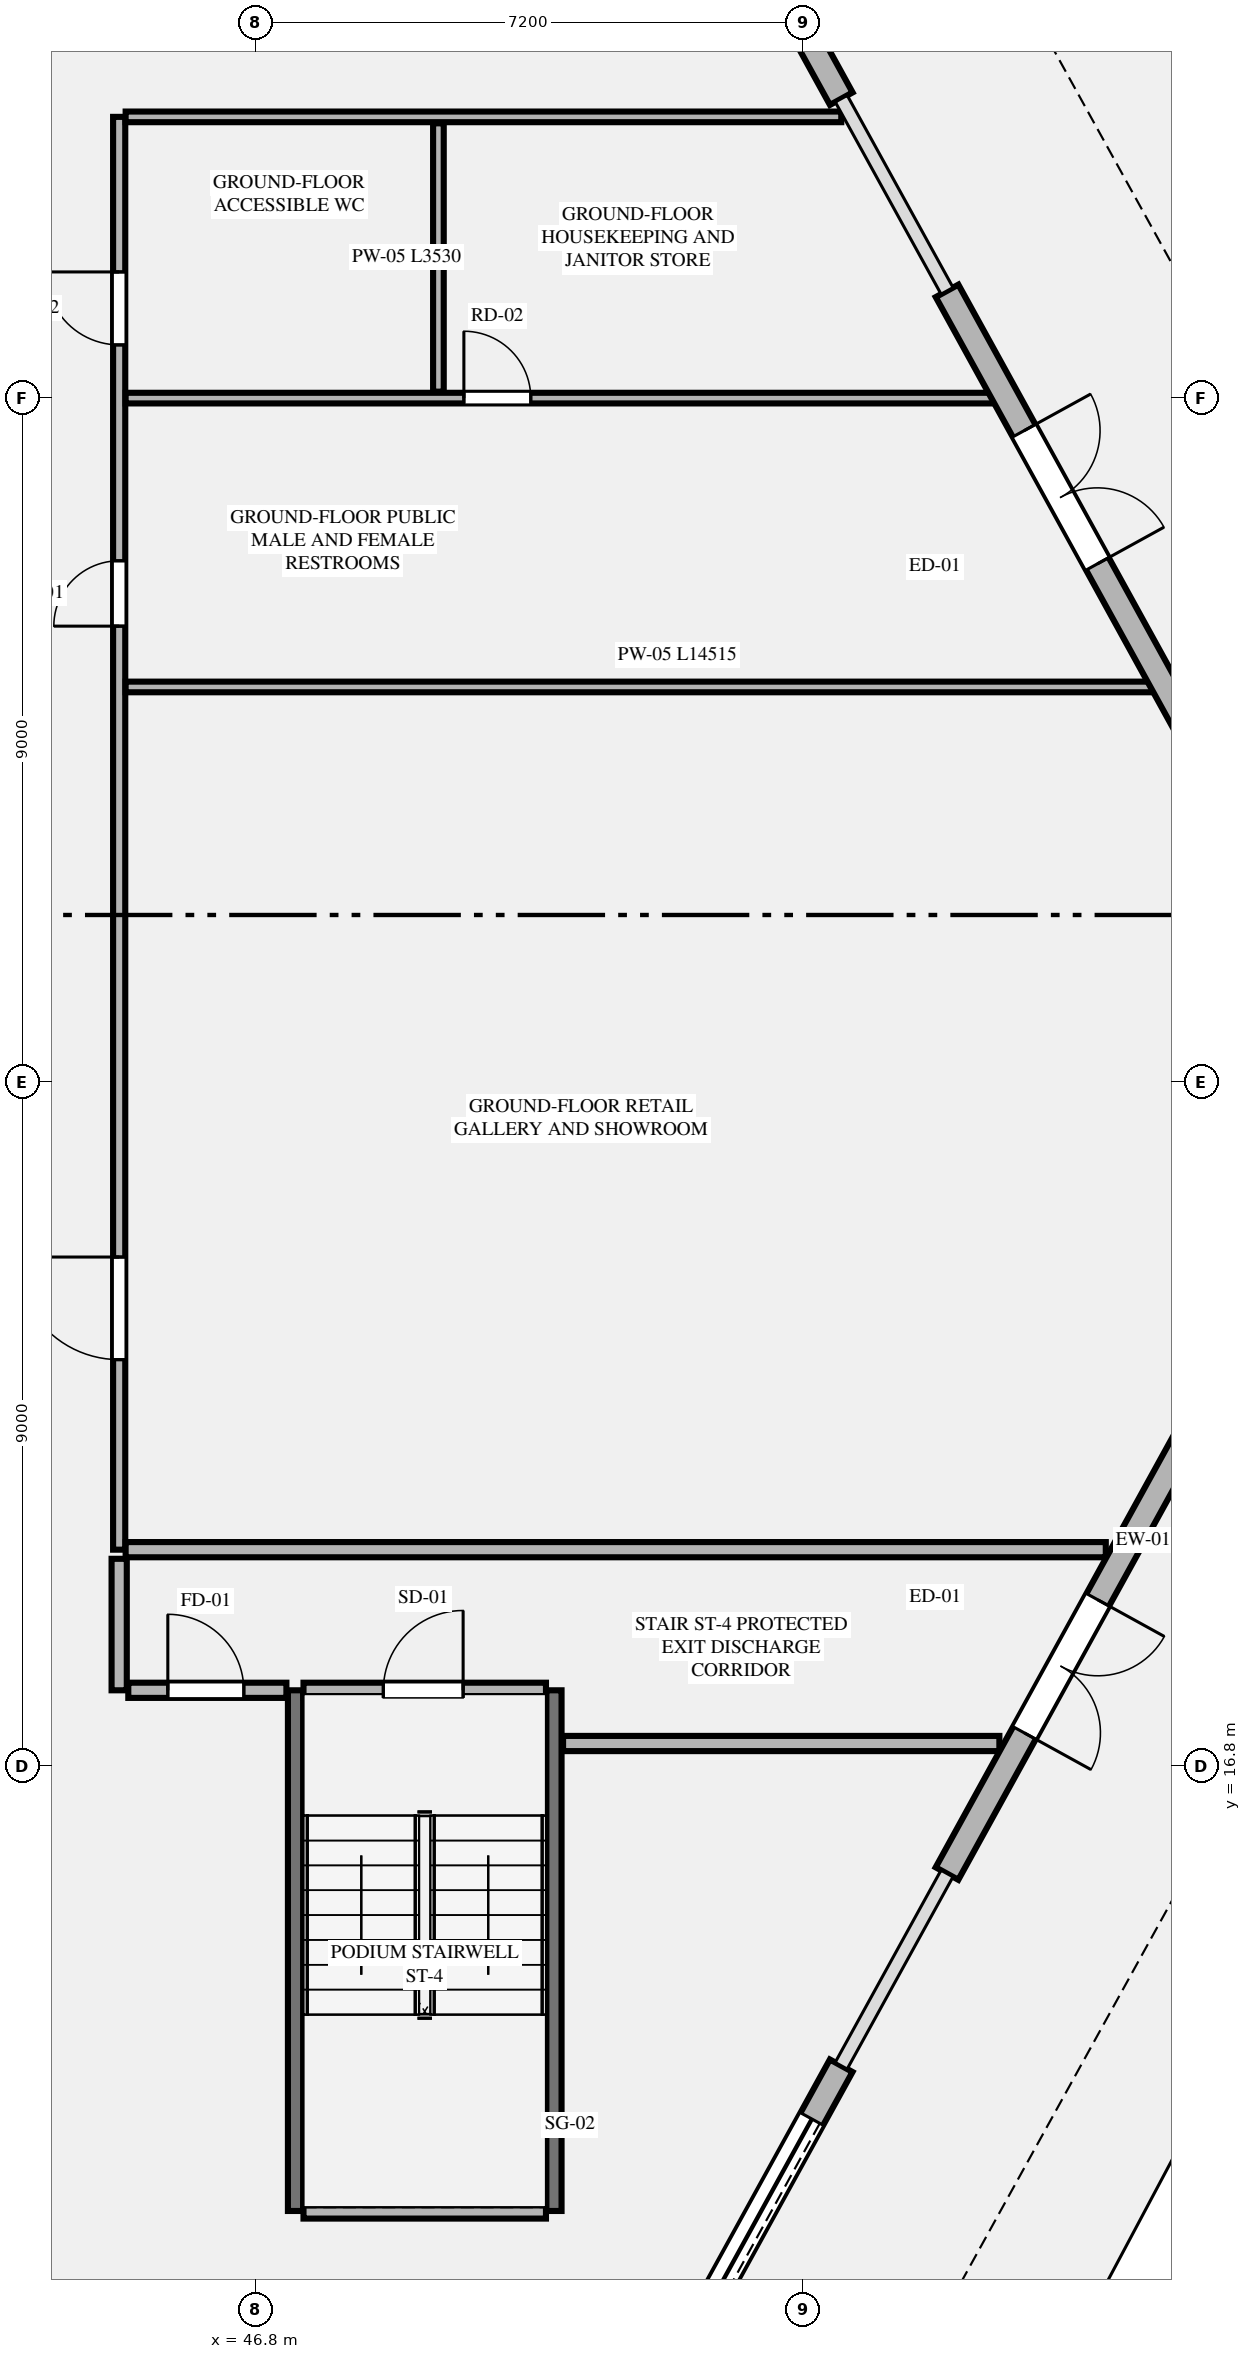
"""IFC4 building model, lengths in metres.
Left out: names, types, materials, properties, quantities, classifications, styles, units other than length and angle.
Written with IfcOpenShell. Run it as: python <this file> out.ifc"""

import sys

from ifc_helpers import new_model, si_unit, direction, frame, frame_2d, origin, place, context, subcontext, project, spatial, rectangle, extrude, element, fill, save


model = new_model("IFC4")
c1 = context("Model", 3, precision=1e-05, world=origin(), true_north=direction((0.0, 1.0)))
c2 = subcontext(c1, "Body", "Model", "MODEL_VIEW")
j1 = project(units=[si_unit("LENGTHUNIT", "METRE"), si_unit("PLANEANGLEUNIT", "RADIAN")], contexts=[c1])
p1 = place(None, origin())
s1 = spatial("IfcSite", under=j1, at=p1, CompositionType="ELEMENT")
p2 = place(p1, origin())
s2 = spatial("IfcBuilding", under=s1, at=p2, CompositionType="ELEMENT")
p3 = place(p2, origin())
s3 = spatial("IfcBuildingStorey", under=s2, at=p3, CompositionType="ELEMENT", Elevation=0.0)
for number, where, z_axis, x_axis in (
    (1, (47.32, 10.95, 0.0), (0.0, 0.0, 1.0), (0.0, 1.0, 0.0)),
    (2, (50.72, 10.95, 0.0), (0.0, 0.0, 1.0), (0.0, 1.0, 0.0)),
):
    element("IfcWall", number, at=place(p3, frame(where, z_axis=z_axis, x_axis=x_axis)), inside=s3, PredefinedType="SHEAR", context=c2, shape_type="SweptSolid", body=[
        extrude(rectangle(XDim=6.85, YDim=0.2, at=frame_2d((3.425, 0.0))), origin(), (0.0, 0.0, 1.0), 6.0),
    ])
p4 = place(p3, frame((47.425, 10.95, 0.0), z_axis=(0.0, 0.0, 1.0), x_axis=(1.0, 0.0, 0.0)))
e3 = element("IfcWall", 3, at=p4, inside=s3, PredefinedType="PLUMBINGWALL", context=c2, shape_type="SweptSolid", body=[
    extrude(rectangle(XDim=3.19, YDim=0.2, at=frame_2d((1.595, 0.0))), origin(), (0.0, 0.0, 1.0), 5.75),
])
p5 = place(p3, frame((47.425, 17.8, 0.0), z_axis=(0.0, 0.0, 1.0), x_axis=(1.0, 0.0, 0.0)))
e4 = element("IfcWall", 4, at=p5, inside=s3, PredefinedType="PLUMBINGWALL", context=c2, shape_type="SweptSolid", body=[
    extrude(rectangle(XDim=3.19, YDim=0.2, at=frame_2d((1.595, 0.0))), origin(), (0.0, 0.0, 1.0), 5.75),
])
p6 = place(p5, frame((1.05, 0.0, 0.0)))
e5 = element("IfcOpeningElement", 5, at=p6, cuts=e4, PredefinedType="OPENING", context=c2, shape_type="SweptSolid", body=[
    extrude(rectangle(XDim=1.05, YDim=2.15, at=frame_2d((0.525, 1.075))), frame((0.0, 0.11, 0.0), z_axis=(0.0, -1.0, 0.0), x_axis=(1.0, 0.0, 0.0)), (0.0, 0.0, 1.0), 0.22),
])
p7 = place(p3, frame((45.0, 19.65, 0.0), z_axis=(0.0, 0.0, 1.0), x_axis=(0.0, 1.0, 0.0)))
e6 = element("IfcWall", 6, at=p7, inside=s3, PredefinedType="PARTITIONING", context=c2, shape_type="SweptSolid", body=[
    extrude(rectangle(XDim=18.85, YDim=0.16, at=frame_2d((9.425, 0.0))), origin(), (0.0, 0.0, 1.0), 5.75),
])
p8 = place(p7, frame((2.5, 0.0, 0.0)))
e7 = element("IfcOpeningElement", 7, at=p8, cuts=e6, PredefinedType="OPENING", context=c2, shape_type="SweptSolid", body=[
    extrude(rectangle(XDim=1.35, YDim=2.35, at=frame_2d((0.675, 1.175))), frame((0.0, 0.09, 0.0), z_axis=(0.0, -1.0, 0.0), x_axis=(1.0, 0.0, 0.0)), (0.0, 0.0, 1.0), 0.18),
])
p9 = place(p7, frame((12.15, 0.0, 0.0)))
e8 = element("IfcOpeningElement", 8, at=p9, cuts=e6, PredefinedType="OPENING", context=c2, shape_type="SweptSolid", body=[
    extrude(rectangle(XDim=0.86, YDim=2.1, at=frame_2d((0.43, 1.05))), frame((0.0, 0.09, 0.0), z_axis=(0.0, -1.0, 0.0), x_axis=(1.0, 0.0, 0.0)), (0.0, 0.0, 1.0), 0.18),
])
p10 = place(p7, frame((15.85, 0.0, 0.0)))
e9 = element("IfcOpeningElement", 9, at=p10, cuts=e6, PredefinedType="OPENING", context=c2, shape_type="SweptSolid", body=[
    extrude(rectangle(XDim=0.96, YDim=2.15, at=frame_2d((0.48, 1.075))), frame((0.0, 0.09, 0.0), z_axis=(0.0, -1.0, 0.0), x_axis=(1.0, 0.0, 0.0)), (0.0, 0.0, 1.0), 0.18),
])
p11 = place(p3, frame((45.085, 19.65, 0.0), z_axis=(0.0, 0.0, 1.0), x_axis=(1.0, 0.0, 0.0)))
e10 = element("IfcWall", 10, at=p11, inside=s3, PredefinedType="PLUMBINGWALL", context=c2, shape_type="SweptSolid", body=[
    extrude(rectangle(XDim=12.895, YDim=0.2, at=frame_2d((6.448, 0.0))), origin(), (0.0, 0.0, 1.0), 4.978),
])
p12 = place(p3, frame((50.84, 17.1, 0.0), z_axis=(0.0, 0.0, 1.0), x_axis=(1.0, 0.0, 0.0)))
e11 = element("IfcWall", 11, at=p12, inside=s3, PredefinedType="PLUMBINGWALL", context=c2, shape_type="SweptSolid", body=[
    extrude(rectangle(XDim=5.74, YDim=0.2, at=frame_2d((2.87, 0.0))), origin(), (0.0, 0.0, 1.0), 5.75),
])
p13 = place(p3, frame((45.0, 17.8, 0.0), z_axis=(0.0, 0.0, 1.0), x_axis=(0.0, 1.0, 0.0)))
e12 = element("IfcWall", 12, at=p13, inside=s3, PredefinedType="PLUMBINGWALL", context=c2, shape_type="SweptSolid", body=[
    extrude(rectangle(XDim=1.73, YDim=0.2, at=frame_2d((0.865, 0.0))), origin(), (0.0, 0.0, 1.0), 5.75),
])
p14 = place(p3, frame((45.12, 17.8, 0.0), z_axis=(0.0, 0.0, 1.0), x_axis=(1.0, 0.0, 0.0)))
e13 = element("IfcWall", 13, at=p14, inside=s3, PredefinedType="PLUMBINGWALL", context=c2, shape_type="SweptSolid", body=[
    extrude(rectangle(XDim=2.08, YDim=0.2, at=frame_2d((1.04, 0.0))), origin(), (0.0, 0.0, 1.0), 5.75),
])
p15 = place(p14, frame((0.52, 0.0, 0.0)))
e14 = element("IfcOpeningElement", 14, at=p15, cuts=e13, PredefinedType="OPENING", context=c2, shape_type="SweptSolid", body=[
    extrude(rectangle(XDim=1.0, YDim=2.15, at=frame_2d((0.5, 1.075))), frame((0.0, 0.11, 0.0), z_axis=(0.0, -1.0, 0.0), x_axis=(1.0, 0.0, 0.0)), (0.0, 0.0, 1.0), 0.22),
])
p16 = place(p3, frame((45.085, 31.0, 0.0), z_axis=(0.0, 0.0, 1.0), x_axis=(1.0, 0.0, 0.0)))
e15 = element("IfcWall", 15, at=p16, inside=s3, PredefinedType="PLUMBINGWALL", context=c2, shape_type="SweptSolid", body=[
    extrude(rectangle(XDim=14.515, YDim=0.14, at=frame_2d((7.258, 0.0))), origin(), (0.0, 0.0, 1.0), 5.75),
])
p17 = place(p3, frame((45.085, 34.8, 0.0), z_axis=(0.0, 0.0, 1.0), x_axis=(1.0, 0.0, 0.0)))
e16 = element("IfcWall", 16, at=p17, inside=s3, PredefinedType="PLUMBINGWALL", context=c2, shape_type="SweptSolid", body=[
    extrude(rectangle(XDim=11.465, YDim=0.14, at=frame_2d((5.732, 0.0))), origin(), (0.0, 0.0, 1.0), 5.75),
])
p18 = place(p17, frame((4.45, 0.0, 0.0)))
e17 = element("IfcOpeningElement", 17, at=p18, cuts=e16, PredefinedType="OPENING", context=c2, shape_type="SweptSolid", body=[
    extrude(rectangle(XDim=0.88, YDim=2.15, at=frame_2d((0.44, 1.075))), frame((0.0, 0.08, 0.0), z_axis=(0.0, -1.0, 0.0), x_axis=(1.0, 0.0, 0.0)), (0.0, 0.0, 1.0), 0.16),
])
p19 = place(p3, frame((45.085, 38.5, 0.0), z_axis=(0.0, 0.0, 1.0), x_axis=(1.0, 0.0, 0.0)))
e18 = element("IfcWall", 18, at=p19, inside=s3, PredefinedType="PLUMBINGWALL", context=c2, shape_type="SweptSolid", body=[
    extrude(rectangle(XDim=9.415, YDim=0.14, at=frame_2d((4.708, 0.0))), origin(), (0.0, 0.0, 1.0), 5.75),
])
p20 = place(p3, frame((49.2, 34.885, 0.0), z_axis=(0.0, 0.0, 1.0), x_axis=(0.0, 1.0, 0.0)))
e19 = element("IfcWall", 19, at=p20, inside=s3, PredefinedType="PLUMBINGWALL", context=c2, shape_type="SweptSolid", body=[
    extrude(rectangle(XDim=3.53, YDim=0.14, at=frame_2d((1.765, 0.0))), origin(), (0.0, 0.0, 1.0), 5.75),
])
p21 = place(p3, frame((60.996, 24.658, 0.0), z_axis=(0.0, 0.0, 1.0), x_axis=(-0.482427040838, -0.875936156502, 0.0)))
e20 = element("IfcWall", 20, at=p21, inside=s3, PredefinedType="STANDARD", context=c2, shape_type="SweptSolid", body=[
    extrude(rectangle(XDim=10.582, YDim=0.34, at=frame_2d((5.291, 0.0))), origin(), (0.0, 0.0, 1.0), 5.75),
])
p22 = place(p21, frame((6.47, 0.0, 0.0)))
e21 = element("IfcOpeningElement", 21, at=p22, cuts=e20, PredefinedType="OPENING", context=c2, shape_type="SweptSolid", body=[
    extrude(rectangle(XDim=2.0, YDim=2.4, at=frame_2d((1.0, 1.2))), frame((0.0, 0.18, 0.0), z_axis=(0.0, -1.0, 0.0), x_axis=(1.0, 0.0, 0.0)), (0.0, 0.0, 1.0), 0.36),
])
p23 = place(p3, frame((54.499, 12.861, 0.0), z_axis=(0.0, 0.0, 1.0), x_axis=(-0.48235622808, -0.875975153319, 0.0)))
e22 = element("IfcWall", 22, at=p23, inside=s3, PredefinedType="STANDARD", context=c2, shape_type="SweptSolid", body=[
    extrude(rectangle(XDim=10.581, YDim=0.34, at=frame_2d((5.291, 0.0))), origin(), (0.0, 0.0, 1.0), 5.75),
])
p24 = place(p23, frame((0.8, 0.0, 0.0)))
e23 = element("IfcOpeningElement", 23, at=p24, cuts=e22, PredefinedType="OPENING", context=c2, shape_type="SweptSolid", body=[
    extrude(rectangle(XDim=3.2, YDim=2.6, at=frame_2d((1.6, 1.3))), frame((0.0, 0.18, 0.0), z_axis=(0.0, -1.0, 0.0), x_axis=(1.0, 0.0, 0.0)), (0.0, 0.0, 1.0), 0.36),
])
p25 = place(p3, frame((49.395, 48.008, 0.0), z_axis=(0.0, 0.0, 1.0), x_axis=(0.482427040838, -0.875936156502, 0.0)))
e24 = element("IfcWall", 24, at=p25, inside=s3, PredefinedType="STANDARD", context=c2, shape_type="SweptSolid", body=[
    extrude(rectangle(XDim=10.582, YDim=0.34, at=frame_2d((5.291, 0.0))), origin(), (0.0, 0.0, 1.0), 5.75),
])
p26 = place(p3, frame((55.892, 36.211, 0.0), z_axis=(0.0, 0.0, 1.0), x_axis=(0.48235622808, -0.875975153319, 0.0)))
e25 = element("IfcWall", 25, at=p26, inside=s3, PredefinedType="STANDARD", context=c2, shape_type="SweptSolid", body=[
    extrude(rectangle(XDim=10.581, YDim=0.34, at=frame_2d((5.291, 0.0))), origin(), (0.0, 0.0, 1.0), 5.75),
])
p27 = place(p26, frame((2.1, 0.0, 0.0)))
e26 = element("IfcOpeningElement", 26, at=p27, cuts=e25, PredefinedType="OPENING", context=c2, shape_type="SweptSolid", body=[
    extrude(rectangle(XDim=2.0, YDim=2.4, at=frame_2d((1.0, 1.2))), frame((0.0, 0.18, 0.0), z_axis=(0.0, -1.0, 0.0), x_axis=(1.0, 0.0, 0.0)), (0.0, 0.0, 1.0), 0.36),
])
p28 = place(p6, origin())
e27 = element("IfcDoor", 27, at=p28, inside=s3, OperationType="SINGLE_SWING_RIGHT", PredefinedType="DOOR", context=c2, shape_type="SweptSolid", body=[
    extrude(rectangle(XDim=1.05, YDim=2.15, at=frame_2d((0.525, 1.075))), frame((0.0, 0.025, 0.0), z_axis=(0.0, -1.0, 0.0), x_axis=(1.0, 0.0, 0.0)), (0.0, 0.0, 1.0), 0.05),
])
fill(e5, e27)
p29 = place(p15, origin())
e28 = element("IfcDoor", 28, at=p29, inside=s3, OperationType="SINGLE_SWING_LEFT", PredefinedType="DOOR", context=c2, shape_type="SweptSolid", body=[
    extrude(rectangle(XDim=1.0, YDim=2.15, at=frame_2d((0.5, 1.075))), frame((0.0, 0.025, 0.0), z_axis=(0.0, -1.0, 0.0), x_axis=(1.0, 0.0, 0.0)), (0.0, 0.0, 1.0), 0.05),
])
fill(e14, e28)
p30 = place(p8, origin())
e29 = element("IfcDoor", 29, at=p30, inside=s3, OperationType="SINGLE_SWING_RIGHT", PredefinedType="DOOR", context=c2, shape_type="SweptSolid", body=[
    extrude(rectangle(XDim=1.35, YDim=2.35, at=frame_2d((0.675, 1.175))), frame((0.0, 0.025, 0.0), z_axis=(0.0, -1.0, 0.0), x_axis=(1.0, 0.0, 0.0)), (0.0, 0.0, 1.0), 0.05),
])
fill(e7, e29)
p31 = place(p9, origin())
e30 = element("IfcDoor", 30, at=p31, inside=s3, OperationType="SINGLE_SWING_LEFT", PredefinedType="DOOR", context=c2, shape_type="SweptSolid", body=[
    extrude(rectangle(XDim=0.86, YDim=2.1, at=frame_2d((0.43, 1.05))), frame((0.0, 0.025, 0.0), z_axis=(0.0, -1.0, 0.0), x_axis=(1.0, 0.0, 0.0)), (0.0, 0.0, 1.0), 0.05),
])
fill(e8, e30)
p32 = place(p10, origin())
e31 = element("IfcDoor", 31, at=p32, inside=s3, OperationType="SINGLE_SWING_RIGHT", PredefinedType="DOOR", context=c2, shape_type="SweptSolid", body=[
    extrude(rectangle(XDim=0.96, YDim=2.15, at=frame_2d((0.48, 1.075))), frame((0.0, 0.025, 0.0), z_axis=(0.0, -1.0, 0.0), x_axis=(1.0, 0.0, 0.0)), (0.0, 0.0, 1.0), 0.05),
])
fill(e9, e31)
p33 = place(p18, origin())
e32 = element("IfcDoor", 32, at=p33, inside=s3, OperationType="SINGLE_SWING_LEFT", PredefinedType="DOOR", context=c2, shape_type="SweptSolid", body=[
    extrude(rectangle(XDim=0.88, YDim=2.15, at=frame_2d((0.44, 1.075))), frame((0.0, 0.025, 0.0), z_axis=(0.0, -1.0, 0.0), x_axis=(1.0, 0.0, 0.0)), (0.0, 0.0, 1.0), 0.05),
])
fill(e17, e32)
p34 = place(p22, origin())
e33 = element("IfcDoor", 33, at=p34, inside=s3, OperationType="DOUBLE_DOOR_SINGLE_SWING", PredefinedType="DOOR", context=c2, shape_type="SweptSolid", body=[
    extrude(rectangle(XDim=2.0, YDim=2.4, at=frame_2d((1.0, 1.2))), frame((0.0, 0.025, 0.0), z_axis=(0.0, -1.0, 0.0), x_axis=(1.0, 0.0, 0.0)), (0.0, 0.0, 1.0), 0.05),
])
fill(e21, e33)
p35 = place(p24, origin())
e34 = element("IfcDoor", 34, at=p35, inside=s3, OperationType="DOUBLE_DOOR_SINGLE_SWING", PredefinedType="GATE", context=c2, shape_type="SweptSolid", body=[
    extrude(rectangle(XDim=3.2, YDim=2.6, at=frame_2d((1.6, 1.3))), frame((0.0, 0.025, 0.0), z_axis=(0.0, -1.0, 0.0), x_axis=(1.0, 0.0, 0.0)), (0.0, 0.0, 1.0), 0.05),
])
fill(e23, e34)
p36 = place(p27, origin())
e35 = element("IfcDoor", 35, at=p36, inside=s3, OperationType="DOUBLE_DOOR_SINGLE_SWING", PredefinedType="DOOR", context=c2, shape_type="SweptSolid", body=[
    extrude(rectangle(XDim=2.0, YDim=2.4, at=frame_2d((1.0, 1.2))), frame((0.0, 0.025, 0.0), z_axis=(0.0, -1.0, 0.0), x_axis=(1.0, 0.0, 0.0)), (0.0, 0.0, 1.0), 0.05),
])
fill(e26, e35)
save(model, sys.argv[1])
